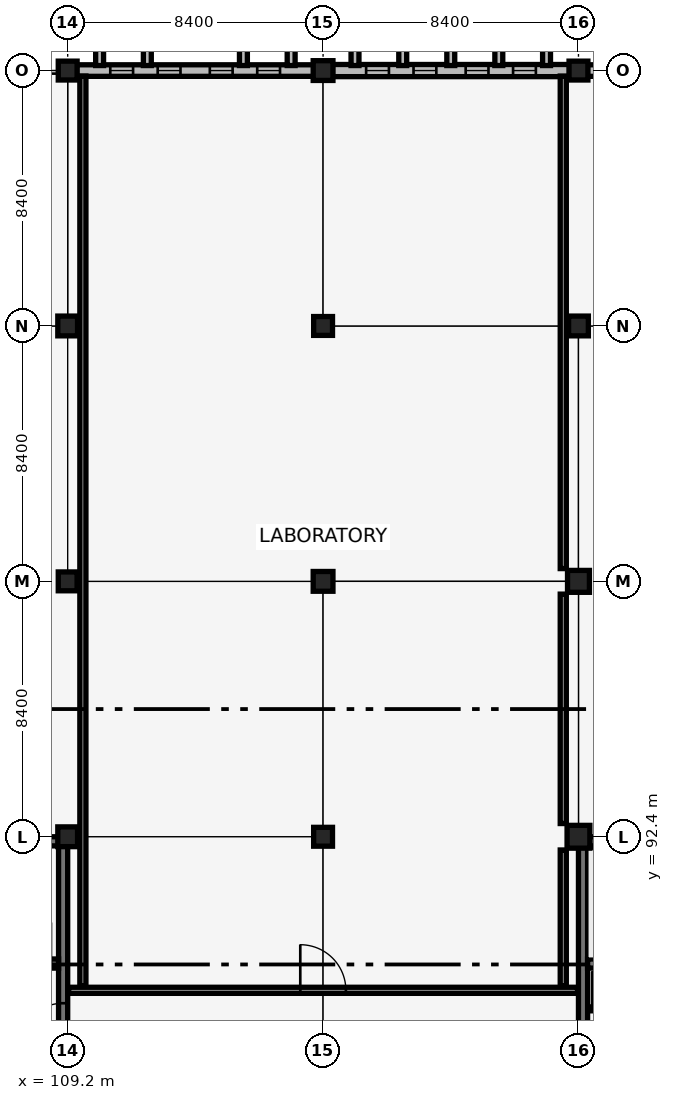
"""IFC4 building model, lengths in metres.
Left out: names, types, materials, properties, quantities, classifications, styles, units other than length and angle.
Written with IfcOpenShell. Run it as: python <this file> out.ifc"""

import sys

from ifc_helpers import new_model, si_unit, direction, frame, frame_2d, origin, origin_2d, place, context, subcontext, project, spatial, rectangle, extrude, element, fill, save


model = new_model("IFC4")
c1 = context("Model", 3, precision=1e-05, world=origin(), true_north=direction((0.0, 1.0)))
c2 = subcontext(c1, "Body", "Model", "MODEL_VIEW")
j1 = project(units=[si_unit("LENGTHUNIT", "METRE"), si_unit("PLANEANGLEUNIT", "RADIAN")], contexts=[c1])
p1 = place(None, origin())
s1 = spatial("IfcSite", under=j1, at=p1, CompositionType="ELEMENT")
p2 = place(p1, origin())
s2 = spatial("IfcBuilding", under=s1, at=p2, CompositionType="ELEMENT")
p3 = place(p2, frame((0.0, 0.0, 5.44)))
s3 = spatial("IfcBuildingStorey", under=s2, at=p3, CompositionType="ELEMENT", Elevation=5.44)
for number, where, z_axis, x_axis in (
    (1, (126.15, 92.25, 0.0), (0.0, 0.0, 1.0), (1.0, 0.0, 0.0)),
    (2, (126.15, 84.15, 0.0), (0.0, 0.0, 1.0), (0.0, 1.0, 0.0)),
):
    element("IfcWall", number, at=place(p3, frame(where, z_axis=z_axis, x_axis=x_axis)), inside=s3, PredefinedType="SHEAR", context=c2, shape_type="SweptSolid", body=[
        extrude(rectangle(XDim=8.1, YDim=0.3, at=frame_2d((4.05, 0.0))), origin(), (0.0, 0.0, 1.0), 4.12),
    ])
p4 = place(p3, frame((126.3, 88.23, 0.0), z_axis=(0.0, 0.0, 1.0), x_axis=(1.0, 0.0, 0.0)))
e3 = element("IfcWall", 3, at=p4, inside=s3, PredefinedType="SHEAR", context=c2, shape_type="SweptSolid", body=[
    extrude(rectangle(XDim=7.8, YDim=0.3, at=frame_2d((3.9, 0.0))), origin(), (0.0, 0.0, 1.0), 4.12),
])
p5 = place(p4, frame((6.2, 0.0, 0.0)))
e4 = element("IfcOpeningElement", 4, at=p5, cuts=e3, PredefinedType="OPENING", context=c2, shape_type="SweptSolid", body=[
    extrude(rectangle(XDim=1.35, YDim=2.15, at=frame_2d((0.675, 1.075))), frame((0.0, 0.16, 0.0), z_axis=(0.0, -1.0, 0.0), x_axis=(1.0, 0.0, 0.0)), (0.0, 0.0, 1.0), 0.32),
])
p6 = place(p3, frame((100.95, 92.25, 0.0), z_axis=(0.0, 0.0, 1.0), x_axis=(1.0, 0.0, 0.0)))
e5 = element("IfcWall", 5, at=p6, inside=s3, PredefinedType="SHEAR", context=c2, shape_type="SweptSolid", body=[
    extrude(rectangle(XDim=8.1, YDim=0.3, at=frame_2d((4.05, 0.0))), origin(), (0.0, 0.0, 1.0), 4.12),
])
p7 = place(p3, frame((109.05, 84.15, 0.0), z_axis=(0.0, 0.0, 1.0), x_axis=(0.0, 1.0, 0.0)))
e6 = element("IfcWall", 6, at=p7, inside=s3, PredefinedType="SHEAR", context=c2, shape_type="SweptSolid", body=[
    extrude(rectangle(XDim=8.1, YDim=0.3, at=frame_2d((4.05, 0.0))), origin(), (0.0, 0.0, 1.0), 4.12),
])
p8 = place(p7, frame((1.325, 0.0, 0.0)))
e7 = element("IfcOpeningElement", 7, at=p8, cuts=e6, PredefinedType="OPENING", context=c2, shape_type="SweptSolid", body=[
    extrude(rectangle(XDim=1.45, YDim=2.15, at=frame_2d((0.725, 1.075))), frame((0.0, 0.16, 0.0), z_axis=(0.0, -1.0, 0.0), x_axis=(1.0, 0.0, 0.0)), (0.0, 0.0, 1.0), 0.32),
])
p9 = place(p3, frame((101.1, 88.23, 0.0), z_axis=(0.0, 0.0, 1.0), x_axis=(1.0, 0.0, 0.0)))
e8 = element("IfcWall", 8, at=p9, inside=s3, PredefinedType="SHEAR", context=c2, shape_type="SweptSolid", body=[
    extrude(rectangle(XDim=7.8, YDim=0.3, at=frame_2d((3.9, 0.0))), origin(), (0.0, 0.0, 1.0), 4.12),
])
p10 = place(p9, frame((6.2, 0.0, 0.0)))
e9 = element("IfcOpeningElement", 9, at=p10, cuts=e8, PredefinedType="OPENING", context=c2, shape_type="SweptSolid", body=[
    extrude(rectangle(XDim=1.35, YDim=2.15, at=frame_2d((0.675, 1.075))), frame((0.0, 0.16, 0.0), z_axis=(0.0, -1.0, 0.0), x_axis=(1.0, 0.0, 0.0)), (0.0, 0.0, 1.0), 0.32),
])
p11 = place(p3, frame((109.2, 92.4, 0.0), z_axis=(0.0, 0.0, 1.0), x_axis=(1.0, 0.0, 0.0)))
e10 = element("IfcColumn", 10, at=p11, inside=s3, PredefinedType="COLUMN", context=c2, shape_type="SweptSolid", body=[
    extrude(rectangle(XDim=0.65, YDim=0.65, at=origin_2d()), origin(), (0.0, 0.0, 1.0), 4.12),
])
p12 = place(p3, frame((109.2, 100.8, 0.0), z_axis=(0.0, 0.0, 1.0), x_axis=(1.0, 0.0, 0.0)))
e11 = element("IfcColumn", 11, at=p12, inside=s3, PredefinedType="COLUMN", context=c2, shape_type="SweptSolid", body=[
    extrude(rectangle(XDim=0.62, YDim=0.62, at=origin_2d()), origin(), (0.0, 0.0, 1.0), 4.12),
])
p13 = place(p3, frame((109.2, 109.2, 0.0), z_axis=(0.0, 0.0, 1.0), x_axis=(1.0, 0.0, 0.0)))
e12 = element("IfcColumn", 12, at=p13, inside=s3, PredefinedType="COLUMN", context=c2, shape_type="SweptSolid", body=[
    extrude(rectangle(XDim=0.65, YDim=0.65, at=origin_2d()), origin(), (0.0, 0.0, 1.0), 4.12),
])
for number, where, z_axis, x_axis in (
    (13, (109.2, 117.6, 0.0), (0.0, 0.0, 1.0), (1.0, 0.0, 0.0)),
    (14, (117.6, 92.4, 0.0), (0.0, 0.0, 1.0), (1.0, 0.0, 0.0)),
):
    element("IfcColumn", number, at=place(p3, frame(where, z_axis=z_axis, x_axis=x_axis)), inside=s3, PredefinedType="COLUMN", context=c2, shape_type="SweptSolid", body=[
        extrude(rectangle(XDim=0.62, YDim=0.62, at=origin_2d()), origin(), (0.0, 0.0, 1.0), 4.12),
    ])
p14 = place(p3, frame((117.6, 100.8, 0.0), z_axis=(0.0, 0.0, 1.0), x_axis=(1.0, 0.0, 0.0)))
e15 = element("IfcColumn", 15, at=p14, inside=s3, PredefinedType="COLUMN", context=c2, shape_type="SweptSolid", body=[
    extrude(rectangle(XDim=0.65, YDim=0.65, at=origin_2d()), origin(), (0.0, 0.0, 1.0), 4.12),
])
p15 = place(p3, frame((117.6, 109.2, 0.0), z_axis=(0.0, 0.0, 1.0), x_axis=(1.0, 0.0, 0.0)))
e16 = element("IfcColumn", 16, at=p15, inside=s3, PredefinedType="COLUMN", context=c2, shape_type="SweptSolid", body=[
    extrude(rectangle(XDim=0.62, YDim=0.62, at=origin_2d()), origin(), (0.0, 0.0, 1.0), 4.12),
])
p16 = place(p3, frame((117.6, 117.6, 0.0), z_axis=(0.0, 0.0, 1.0), x_axis=(1.0, 0.0, 0.0)))
e17 = element("IfcColumn", 17, at=p16, inside=s3, PredefinedType="COLUMN", context=c2, shape_type="SweptSolid", body=[
    extrude(rectangle(XDim=0.65, YDim=0.65, at=origin_2d()), origin(), (0.0, 0.0, 1.0), 4.12),
])
p17 = place(p3, frame((126.0, 92.4, 0.0), z_axis=(0.0, 0.0, 1.0), x_axis=(1.0, 0.0, 0.0)))
e18 = element("IfcColumn", 18, at=p17, inside=s3, PredefinedType="COLUMN", context=c2, shape_type="SweptSolid", body=[
    extrude(rectangle(XDim=0.75, YDim=0.75, at=origin_2d()), origin(), (0.0, 0.0, 1.0), 4.12),
])
p18 = place(p3, frame((126.0, 100.8, 0.0), z_axis=(0.0, 0.0, 1.0), x_axis=(1.0, 0.0, 0.0)))
e19 = element("IfcColumn", 19, at=p18, inside=s3, PredefinedType="COLUMN", context=c2, shape_type="SweptSolid", body=[
    extrude(rectangle(XDim=0.72, YDim=0.72, at=origin_2d()), origin(), (0.0, 0.0, 1.0), 4.12),
])
p19 = place(p3, frame((126.0, 109.2, 0.0), z_axis=(0.0, 0.0, 1.0), x_axis=(1.0, 0.0, 0.0)))
e20 = element("IfcColumn", 20, at=p19, inside=s3, PredefinedType="COLUMN", context=c2, shape_type="SweptSolid", body=[
    extrude(rectangle(XDim=0.65, YDim=0.65, at=origin_2d()), origin(), (0.0, 0.0, 1.0), 4.12),
])
p20 = place(p3, frame((126.0, 117.6, 0.0), z_axis=(0.0, 0.0, 1.0), x_axis=(1.0, 0.0, 0.0)))
e21 = element("IfcColumn", 21, at=p20, inside=s3, PredefinedType="COLUMN", context=c2, shape_type="SweptSolid", body=[
    extrude(rectangle(XDim=0.62, YDim=0.62, at=origin_2d()), origin(), (0.0, 0.0, 1.0), 4.12),
])
p21 = place(p3, frame((109.495, 117.6, 0.0), z_axis=(0.0, 0.0, 1.0), x_axis=(1.0, 0.0, 0.0)))
e22 = element("IfcWall", 22, at=p21, inside=s3, PredefinedType="SOLIDWALL", context=c2, shape_type="SweptSolid", body=[
    extrude(rectangle(XDim=7.795, YDim=0.38, at=frame_2d((3.897, 0.0))), origin(), (0.0, 0.0, 1.0), 3.38),
])
p22 = place(p21, frame((1.106, 0.0, 0.7)))
e23 = element("IfcOpeningElement", 23, at=p22, cuts=e22, PredefinedType="OPENING", context=c2, shape_type="SweptSolid", body=[
    extrude(rectangle(XDim=0.75, YDim=2.1, at=frame_2d((0.375, 1.05))), frame((0.0, 0.2, 0.0), z_axis=(0.0, -1.0, 0.0), x_axis=(1.0, 0.0, 0.0)), (0.0, 0.0, 1.0), 0.4),
])
p23 = place(p21, frame((2.665, 0.0, 0.7)))
e24 = element("IfcOpeningElement", 24, at=p23, cuts=e22, PredefinedType="OPENING", context=c2, shape_type="SweptSolid", body=[
    extrude(rectangle(XDim=0.75, YDim=2.1, at=frame_2d((0.375, 1.05))), frame((0.0, 0.2, 0.0), z_axis=(0.0, -1.0, 0.0), x_axis=(1.0, 0.0, 0.0)), (0.0, 0.0, 1.0), 0.4),
])
p24 = place(p21, frame((4.38, 0.0, 0.7)))
e25 = element("IfcOpeningElement", 25, at=p24, cuts=e22, PredefinedType="OPENING", context=c2, shape_type="SweptSolid", body=[
    extrude(rectangle(XDim=0.75, YDim=2.1, at=frame_2d((0.375, 1.05))), frame((0.0, 0.2, 0.0), z_axis=(0.0, -1.0, 0.0), x_axis=(1.0, 0.0, 0.0)), (0.0, 0.0, 1.0), 0.4),
])
p25 = place(p21, frame((5.939, 0.0, 0.7)))
e26 = element("IfcOpeningElement", 26, at=p25, cuts=e22, PredefinedType="OPENING", context=c2, shape_type="SweptSolid", body=[
    extrude(rectangle(XDim=0.75, YDim=2.1, at=frame_2d((0.375, 1.05))), frame((0.0, 0.2, 0.0), z_axis=(0.0, -1.0, 0.0), x_axis=(1.0, 0.0, 0.0)), (0.0, 0.0, 1.0), 0.4),
])
for number, where, z_axis, x_axis in (
    (27, (110.25, 117.765, 0.0), (0.0, 0.0, 1.0), (0.0, 1.0, 0.0)),
    (28, (111.82, 117.765, 0.0), (0.0, 0.0, 1.0), (0.0, 1.0, 0.0)),
    (29, (114.98, 117.765, 0.0), (0.0, 0.0, 1.0), (0.0, 1.0, 0.0)),
    (30, (116.55, 117.765, 0.0), (0.0, 0.0, 1.0), (0.0, 1.0, 0.0)),
):
    element("IfcWall", number, at=place(p3, frame(where, z_axis=z_axis, x_axis=x_axis)), inside=s3, PredefinedType="SOLIDWALL", context=c2, shape_type="SweptSolid", body=[
        extrude(rectangle(XDim=0.7, YDim=0.26, at=frame_2d((0.35, 0.0))), origin(), (0.0, 0.0, 1.0), 4.42),
    ])
p26 = place(p3, frame((117.91, 117.6, 0.0), z_axis=(0.0, 0.0, 1.0), x_axis=(1.0, 0.0, 0.0)))
e31 = element("IfcWall", 31, at=p26, inside=s3, PredefinedType="SOLIDWALL", context=c2, shape_type="SweptSolid", body=[
    extrude(rectangle(XDim=7.795, YDim=0.4, at=frame_2d((3.897, 0.0))), origin(), (0.0, 0.0, 1.0), 3.38),
])
p27 = place(p26, frame((1.106, 0.0, 0.7)))
e32 = element("IfcOpeningElement", 32, at=p27, cuts=e31, PredefinedType="OPENING", context=c2, shape_type="SweptSolid", body=[
    extrude(rectangle(XDim=0.75, YDim=2.1, at=frame_2d((0.375, 1.05))), frame((0.0, 0.21, 0.0), z_axis=(0.0, -1.0, 0.0), x_axis=(1.0, 0.0, 0.0)), (0.0, 0.0, 1.0), 0.42),
])
p28 = place(p26, frame((2.665, 0.0, 0.7)))
e33 = element("IfcOpeningElement", 33, at=p28, cuts=e31, PredefinedType="OPENING", context=c2, shape_type="SweptSolid", body=[
    extrude(rectangle(XDim=0.75, YDim=2.1, at=frame_2d((0.375, 1.05))), frame((0.0, 0.21, 0.0), z_axis=(0.0, -1.0, 0.0), x_axis=(1.0, 0.0, 0.0)), (0.0, 0.0, 1.0), 0.42),
])
p29 = place(p26, frame((4.38, 0.0, 0.7)))
e34 = element("IfcOpeningElement", 34, at=p29, cuts=e31, PredefinedType="OPENING", context=c2, shape_type="SweptSolid", body=[
    extrude(rectangle(XDim=0.75, YDim=2.1, at=frame_2d((0.375, 1.05))), frame((0.0, 0.21, 0.0), z_axis=(0.0, -1.0, 0.0), x_axis=(1.0, 0.0, 0.0)), (0.0, 0.0, 1.0), 0.42),
])
p30 = place(p26, frame((5.939, 0.0, 0.7)))
e35 = element("IfcOpeningElement", 35, at=p30, cuts=e31, PredefinedType="OPENING", context=c2, shape_type="SweptSolid", body=[
    extrude(rectangle(XDim=0.75, YDim=2.1, at=frame_2d((0.375, 1.05))), frame((0.0, 0.21, 0.0), z_axis=(0.0, -1.0, 0.0), x_axis=(1.0, 0.0, 0.0)), (0.0, 0.0, 1.0), 0.42),
])
for number, where, z_axis, x_axis in (
    (36, (118.65, 117.765, 0.0), (0.0, 0.0, 1.0), (0.0, 1.0, 0.0)),
    (37, (120.22, 117.765, 0.0), (0.0, 0.0, 1.0), (0.0, 1.0, 0.0)),
    (38, (121.8, 117.765, 0.0), (0.0, 0.0, 1.0), (0.0, 1.0, 0.0)),
    (39, (123.38, 117.765, 0.0), (0.0, 0.0, 1.0), (0.0, 1.0, 0.0)),
    (40, (124.95, 117.765, 0.0), (0.0, 0.0, 1.0), (0.0, 1.0, 0.0)),
):
    element("IfcWall", number, at=place(p3, frame(where, z_axis=z_axis, x_axis=x_axis)), inside=s3, PredefinedType="SOLIDWALL", context=c2, shape_type="SweptSolid", body=[
        extrude(rectangle(XDim=0.7, YDim=0.26, at=frame_2d((0.35, 0.0))), origin(), (0.0, 0.0, 1.0), 4.42),
    ])
p31 = place(p3, frame((126.295, 117.6, 0.0), z_axis=(0.0, 0.0, 1.0), x_axis=(1.0, 0.0, 0.0)))
e41 = element("IfcWall", 41, at=p31, inside=s3, PredefinedType="SOLIDWALL", context=c2, shape_type="SweptSolid", body=[
    extrude(rectangle(XDim=7.795, YDim=0.38, at=frame_2d((3.897, 0.0))), origin(), (0.0, 0.0, 1.0), 3.38),
])
p32 = place(p31, frame((1.106, 0.0, 0.7)))
e42 = element("IfcOpeningElement", 42, at=p32, cuts=e41, PredefinedType="OPENING", context=c2, shape_type="SweptSolid", body=[
    extrude(rectangle(XDim=0.75, YDim=2.1, at=frame_2d((0.375, 1.05))), frame((0.0, 0.2, 0.0), z_axis=(0.0, -1.0, 0.0), x_axis=(1.0, 0.0, 0.0)), (0.0, 0.0, 1.0), 0.4),
])
p33 = place(p31, frame((2.665, 0.0, 0.7)))
e43 = element("IfcOpeningElement", 43, at=p33, cuts=e41, PredefinedType="OPENING", context=c2, shape_type="SweptSolid", body=[
    extrude(rectangle(XDim=0.75, YDim=2.1, at=frame_2d((0.375, 1.05))), frame((0.0, 0.2, 0.0), z_axis=(0.0, -1.0, 0.0), x_axis=(1.0, 0.0, 0.0)), (0.0, 0.0, 1.0), 0.4),
])
p34 = place(p31, frame((4.38, 0.0, 0.7)))
e44 = element("IfcOpeningElement", 44, at=p34, cuts=e41, PredefinedType="OPENING", context=c2, shape_type="SweptSolid", body=[
    extrude(rectangle(XDim=0.75, YDim=2.1, at=frame_2d((0.375, 1.05))), frame((0.0, 0.2, 0.0), z_axis=(0.0, -1.0, 0.0), x_axis=(1.0, 0.0, 0.0)), (0.0, 0.0, 1.0), 0.4),
])
p35 = place(p31, frame((5.939, 0.0, 0.7)))
e45 = element("IfcOpeningElement", 45, at=p35, cuts=e41, PredefinedType="OPENING", context=c2, shape_type="SweptSolid", body=[
    extrude(rectangle(XDim=0.75, YDim=2.1, at=frame_2d((0.375, 1.05))), frame((0.0, 0.2, 0.0), z_axis=(0.0, -1.0, 0.0), x_axis=(1.0, 0.0, 0.0)), (0.0, 0.0, 1.0), 0.4),
])
p36 = place(p3, frame((126.32, 86.74, 0.0), z_axis=(0.0, 0.0, 1.0), x_axis=(1.0, 0.0, 0.0)))
e46 = element("IfcWall", 46, at=p36, inside=s3, PredefinedType="PARTITIONING", context=c2, shape_type="SweptSolid", body=[
    extrude(rectangle(XDim=1.62, YDim=0.13, at=frame_2d((0.81, 0.0))), origin(), (0.0, 0.0, 1.0), 4.12),
])
p37 = place(p3, frame((109.23, 87.35, 0.0), z_axis=(0.0, 0.0, 1.0), x_axis=(1.0, 0.0, 0.0)))
e47 = element("IfcWall", 47, at=p37, inside=s3, PredefinedType="PARTITIONING", context=c2, shape_type="SweptSolid", body=[
    extrude(rectangle(XDim=16.74, YDim=0.2, at=frame_2d((8.37, 0.0))), origin(), (0.0, 0.0, 1.0), 3.47),
])
p38 = place(p37, frame((7.62, 0.0, 0.0)))
e48 = element("IfcOpeningElement", 48, at=p38, cuts=e47, PredefinedType="OPENING", context=c2, shape_type="SweptSolid", body=[
    extrude(rectangle(XDim=1.5, YDim=2.2, at=frame_2d((0.75, 1.1))), frame((0.0, 0.11, 0.0), z_axis=(0.0, -1.0, 0.0), x_axis=(1.0, 0.0, 0.0)), (0.0, 0.0, 1.0), 0.22),
])
p39 = place(p3, frame((109.7, 87.5, 0.0), z_axis=(0.0, 0.0, 1.0), x_axis=(0.0, 1.0, 0.0)))
e49 = element("IfcWall", 49, at=p39, inside=s3, PredefinedType="PARTITIONING", context=c2, shape_type="SweptSolid", body=[
    extrude(rectangle(XDim=29.92, YDim=0.2, at=frame_2d((14.96, 0.0))), origin(), (0.0, 0.0, 1.0), 3.34),
])
p40 = place(p3, frame((125.5, 87.5, 0.0), z_axis=(0.0, 0.0, 1.0), x_axis=(0.0, 1.0, 0.0)))
e50 = element("IfcWall", 50, at=p40, inside=s3, PredefinedType="PARTITIONING", context=c2, shape_type="SweptSolid", body=[
    extrude(rectangle(XDim=4.465, YDim=0.2, at=frame_2d((2.232, 0.0))), origin(), (0.0, 0.0, 1.0), 3.6),
])
p41 = place(p3, frame((125.5, 92.835, 0.0), z_axis=(0.0, 0.0, 1.0), x_axis=(0.0, 1.0, 0.0)))
e51 = element("IfcWall", 51, at=p41, inside=s3, PredefinedType="PARTITIONING", context=c2, shape_type="SweptSolid", body=[
    extrude(rectangle(XDim=7.545, YDim=0.2, at=frame_2d((3.772, 0.0))), origin(), (0.0, 0.0, 1.0), 3.62),
])
p42 = place(p3, frame((125.5, 101.22, 0.0), z_axis=(0.0, 0.0, 1.0), x_axis=(0.0, 1.0, 0.0)))
e52 = element("IfcWall", 52, at=p42, inside=s3, PredefinedType="PARTITIONING", context=c2, shape_type="SweptSolid", body=[
    extrude(rectangle(XDim=16.2, YDim=0.2, at=frame_2d((8.1, 0.0))), origin(), (0.0, 0.0, 1.0), 3.38),
])
p43 = place(p22, origin())
e53 = element("IfcWindow", 53, at=p43, inside=s3, PartitioningType="DOUBLE_PANEL_VERTICAL", PredefinedType="WINDOW", context=c2, shape_type="SweptSolid", body=[
    extrude(rectangle(XDim=0.75, YDim=2.1, at=frame_2d((0.375, 1.05))), frame((0.0, 0.03, 0.0), z_axis=(0.0, -1.0, 0.0), x_axis=(1.0, 0.0, 0.0)), (0.0, 0.0, 1.0), 0.06),
])
fill(e23, e53)
p44 = place(p23, origin())
e54 = element("IfcWindow", 54, at=p44, inside=s3, PartitioningType="DOUBLE_PANEL_VERTICAL", PredefinedType="WINDOW", context=c2, shape_type="SweptSolid", body=[
    extrude(rectangle(XDim=0.75, YDim=2.1, at=frame_2d((0.375, 1.05))), frame((0.0, 0.03, 0.0), z_axis=(0.0, -1.0, 0.0), x_axis=(1.0, 0.0, 0.0)), (0.0, 0.0, 1.0), 0.06),
])
fill(e24, e54)
p45 = place(p24, origin())
e55 = element("IfcWindow", 55, at=p45, inside=s3, PartitioningType="DOUBLE_PANEL_VERTICAL", PredefinedType="WINDOW", context=c2, shape_type="SweptSolid", body=[
    extrude(rectangle(XDim=0.75, YDim=2.1, at=frame_2d((0.375, 1.05))), frame((0.0, 0.03, 0.0), z_axis=(0.0, -1.0, 0.0), x_axis=(1.0, 0.0, 0.0)), (0.0, 0.0, 1.0), 0.06),
])
fill(e25, e55)
p46 = place(p25, origin())
e56 = element("IfcWindow", 56, at=p46, inside=s3, PartitioningType="DOUBLE_PANEL_VERTICAL", PredefinedType="WINDOW", context=c2, shape_type="SweptSolid", body=[
    extrude(rectangle(XDim=0.75, YDim=2.1, at=frame_2d((0.375, 1.05))), frame((0.0, 0.03, 0.0), z_axis=(0.0, -1.0, 0.0), x_axis=(1.0, 0.0, 0.0)), (0.0, 0.0, 1.0), 0.06),
])
fill(e26, e56)
p47 = place(p27, origin())
e57 = element("IfcWindow", 57, at=p47, inside=s3, PartitioningType="DOUBLE_PANEL_VERTICAL", PredefinedType="WINDOW", context=c2, shape_type="SweptSolid", body=[
    extrude(rectangle(XDim=0.75, YDim=2.1, at=frame_2d((0.375, 1.05))), frame((0.0, 0.03, 0.0), z_axis=(0.0, -1.0, 0.0), x_axis=(1.0, 0.0, 0.0)), (0.0, 0.0, 1.0), 0.06),
])
fill(e32, e57)
p48 = place(p28, origin())
e58 = element("IfcWindow", 58, at=p48, inside=s3, PartitioningType="DOUBLE_PANEL_VERTICAL", PredefinedType="WINDOW", context=c2, shape_type="SweptSolid", body=[
    extrude(rectangle(XDim=0.75, YDim=2.1, at=frame_2d((0.375, 1.05))), frame((0.0, 0.03, 0.0), z_axis=(0.0, -1.0, 0.0), x_axis=(1.0, 0.0, 0.0)), (0.0, 0.0, 1.0), 0.06),
])
fill(e33, e58)
p49 = place(p29, origin())
e59 = element("IfcWindow", 59, at=p49, inside=s3, PartitioningType="DOUBLE_PANEL_VERTICAL", PredefinedType="WINDOW", context=c2, shape_type="SweptSolid", body=[
    extrude(rectangle(XDim=0.75, YDim=2.1, at=frame_2d((0.375, 1.05))), frame((0.0, 0.03, 0.0), z_axis=(0.0, -1.0, 0.0), x_axis=(1.0, 0.0, 0.0)), (0.0, 0.0, 1.0), 0.06),
])
fill(e34, e59)
p50 = place(p30, origin())
e60 = element("IfcWindow", 60, at=p50, inside=s3, PartitioningType="DOUBLE_PANEL_VERTICAL", PredefinedType="WINDOW", context=c2, shape_type="SweptSolid", body=[
    extrude(rectangle(XDim=0.75, YDim=2.1, at=frame_2d((0.375, 1.05))), frame((0.0, 0.03, 0.0), z_axis=(0.0, -1.0, 0.0), x_axis=(1.0, 0.0, 0.0)), (0.0, 0.0, 1.0), 0.06),
])
fill(e35, e60)
p51 = place(p8, origin())
e61 = element("IfcDoor", 61, at=p51, inside=s3, OperationType="DOUBLE_DOOR_SINGLE_SWING", PredefinedType="DOOR", context=c2, shape_type="SweptSolid", body=[
    extrude(rectangle(XDim=1.45, YDim=2.15, at=frame_2d((0.725, 1.075))), frame((0.0, 0.025, 0.0), z_axis=(0.0, -1.0, 0.0), x_axis=(1.0, 0.0, 0.0)), (0.0, 0.0, 1.0), 0.05),
])
fill(e7, e61)
p52 = place(p38, origin())
e62 = element("IfcDoor", 62, at=p52, inside=s3, OperationType="DOUBLE_DOOR_SINGLE_SWING", PredefinedType="DOOR", context=c2, shape_type="SweptSolid", body=[
    extrude(rectangle(XDim=1.5, YDim=2.2, at=frame_2d((0.75, 1.1))), frame((0.0, 0.025, 0.0), z_axis=(0.0, -1.0, 0.0), x_axis=(1.0, 0.0, 0.0)), (0.0, 0.0, 1.0), 0.05),
])
fill(e48, e62)
save(model, sys.argv[1])
